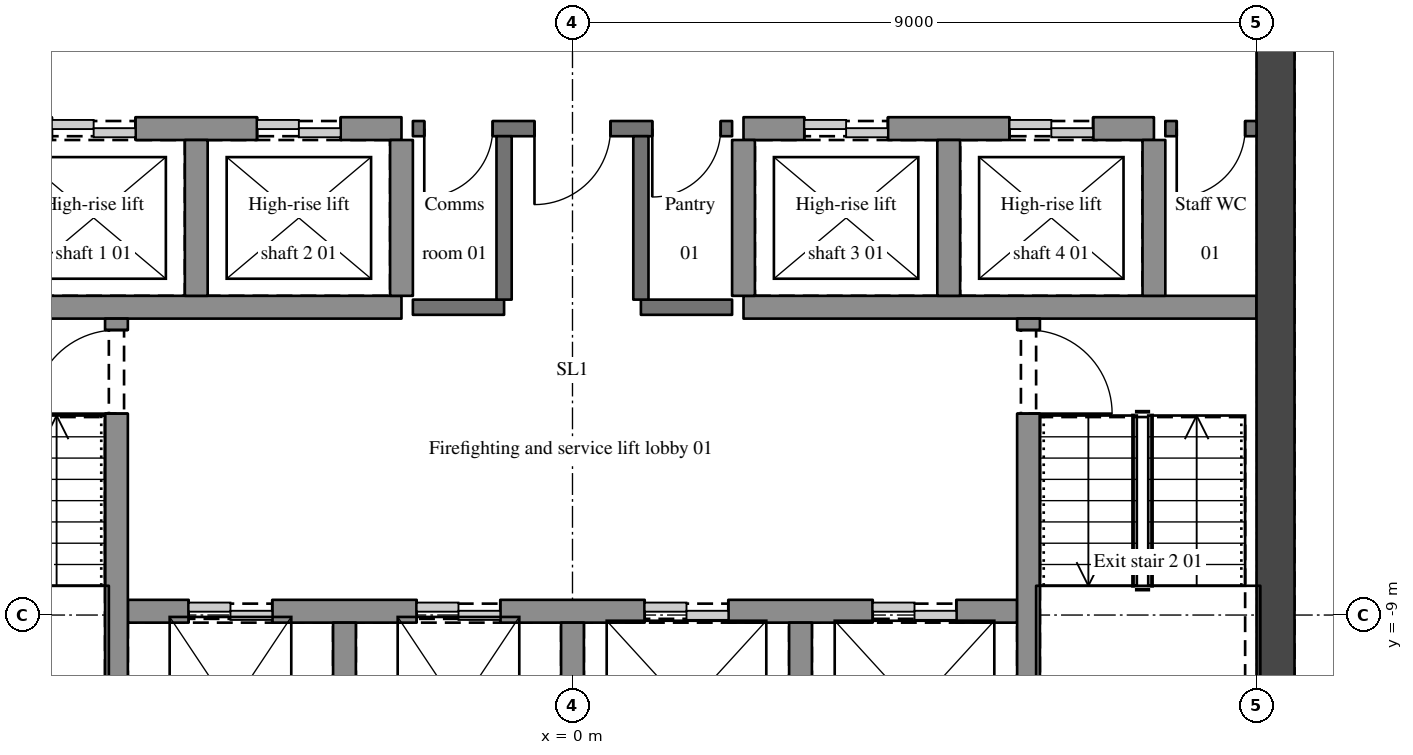
"""IFC4 building model, lengths in metres.
Left out: names, types, materials, properties, quantities, classifications, styles, units other than length and angle.
Written with IfcOpenShell. Run it as: python <this file> out.ifc"""

import sys

from ifc_helpers import new_model, si_unit, direction, frame, frame_2d, origin, place, context, subcontext, project, spatial, rectangle, extrude, element, fill, save


model = new_model("IFC4")
c1 = context("Model", 3, precision=1e-05, world=origin(), true_north=direction((0.0, 1.0)))
c2 = subcontext(c1, "Body", "Model", "MODEL_VIEW")
j1 = project(units=[si_unit("LENGTHUNIT", "METRE"), si_unit("PLANEANGLEUNIT", "RADIAN")], contexts=[c1])
p1 = place(None, origin())
s1 = spatial("IfcSite", under=j1, at=p1, CompositionType="ELEMENT")
p2 = place(p1, origin())
s2 = spatial("IfcBuilding", under=s1, at=p2, CompositionType="ELEMENT")
p3 = place(p2, frame((0.0, 0.0, 251.85)))
s3 = spatial("IfcBuildingStorey", under=s2, at=p3, CompositionType="ELEMENT", Elevation=251.85)
p4 = place(p3, frame((9.25, -11.5, 0.0), z_axis=(0.0, 0.0, 1.0), x_axis=(0.0, 1.0, 0.0)))
e1 = element("IfcWall", 1, at=p4, inside=s3, PredefinedType="SHEAR", context=c2, shape_type="SweptSolid", body=[
    extrude(rectangle(XDim=11.65, YDim=0.5, at=frame_2d((5.825, 0.0))), origin(), (0.0, 0.0, 1.0), 3.15),
])
p5 = place(p3, frame((-5.85, -8.95, 0.0), z_axis=(0.0, 0.0, 1.0), x_axis=(1.0, 0.0, 0.0)))
e2 = element("IfcWall", 2, at=p5, inside=s3, PredefinedType="SHEAR", context=c2, shape_type="SweptSolid", body=[
    extrude(rectangle(XDim=11.7, YDim=0.3, at=frame_2d((5.85, 0.0))), origin(), (0.0, 0.0, 1.0), 3.15),
])
p6 = place(p5, frame((0.8, 0.0, 0.0)))
e3 = element("IfcOpeningElement", 3, at=p6, cuts=e2, PredefinedType="OPENING", context=c2, shape_type="SweptSolid", body=[
    extrude(rectangle(XDim=1.1, YDim=2.1, at=frame_2d((0.55, 1.05))), frame((0.0, 0.16, 0.0), z_axis=(0.0, -1.0, 0.0), x_axis=(1.0, 0.0, 0.0)), (0.0, 0.0, 1.0), 0.32),
])
p7 = place(p5, frame((3.8, 0.0, 0.0)))
e4 = element("IfcOpeningElement", 4, at=p7, cuts=e2, PredefinedType="OPENING", context=c2, shape_type="SweptSolid", body=[
    extrude(rectangle(XDim=1.1, YDim=2.1, at=frame_2d((0.55, 1.05))), frame((0.0, 0.16, 0.0), z_axis=(0.0, -1.0, 0.0), x_axis=(1.0, 0.0, 0.0)), (0.0, 0.0, 1.0), 0.32),
])
p8 = place(p5, frame((6.8, 0.0, 0.0)))
e5 = element("IfcOpeningElement", 5, at=p8, cuts=e2, PredefinedType="OPENING", context=c2, shape_type="SweptSolid", body=[
    extrude(rectangle(XDim=1.1, YDim=2.1, at=frame_2d((0.55, 1.05))), frame((0.0, 0.16, 0.0), z_axis=(0.0, -1.0, 0.0), x_axis=(1.0, 0.0, 0.0)), (0.0, 0.0, 1.0), 0.32),
])
p9 = place(p5, frame((9.8, 0.0, 0.0)))
e6 = element("IfcOpeningElement", 6, at=p9, cuts=e2, PredefinedType="OPENING", context=c2, shape_type="SweptSolid", body=[
    extrude(rectangle(XDim=1.1, YDim=2.1, at=frame_2d((0.55, 1.05))), frame((0.0, 0.16, 0.0), z_axis=(0.0, -1.0, 0.0), x_axis=(1.0, 0.0, 0.0)), (0.0, 0.0, 1.0), 0.32),
])
p10 = place(p3, frame((-9.0, -4.95, 0.0), z_axis=(0.0, 0.0, 1.0), x_axis=(1.0, 0.0, 0.0)))
e7 = element("IfcWall", 7, at=p10, inside=s3, PredefinedType="SHEAR", context=c2, shape_type="SweptSolid", body=[
    extrude(rectangle(XDim=6.75, YDim=0.3, at=frame_2d((3.375, 0.0))), origin(), (0.0, 0.0, 1.0), 3.15),
])
for number, where, z_axis, x_axis in (
    (8, (-2.1, -4.95, 0.0), (0.0, 0.0, 1.0), (1.0, 0.0, 0.0)),
    (9, (0.9, -4.95, 0.0), (0.0, 0.0, 1.0), (1.0, 0.0, 0.0)),
):
    element("IfcWall", number, at=place(p3, frame(where, z_axis=z_axis, x_axis=x_axis)), inside=s3, PredefinedType="SOLIDWALL", context=c2, shape_type="SweptSolid", body=[
        extrude(rectangle(XDim=1.2, YDim=0.2, at=frame_2d((0.6, 0.0))), origin(), (0.0, 0.0, 1.0), 2.85),
    ])
p11 = place(p3, frame((2.25, -4.95, 0.0), z_axis=(0.0, 0.0, 1.0), x_axis=(1.0, 0.0, 0.0)))
e10 = element("IfcWall", 10, at=p11, inside=s3, PredefinedType="SHEAR", context=c2, shape_type="SweptSolid", body=[
    extrude(rectangle(XDim=6.75, YDim=0.3, at=frame_2d((3.375, 0.0))), origin(), (0.0, 0.0, 1.0), 3.15),
])
p12 = place(p3, frame((-7.65, -2.6, 0.0), z_axis=(0.0, 0.0, 1.0), x_axis=(1.0, 0.0, 0.0)))
e11 = element("IfcWall", 11, at=p12, inside=s3, PredefinedType="SHEAR", context=c2, shape_type="SweptSolid", body=[
    extrude(rectangle(XDim=5.4, YDim=0.3, at=frame_2d((2.7, 0.0))), origin(), (0.0, 0.0, 1.0), 3.15),
])
p13 = place(p12, frame((0.8, 0.0, 0.0)))
e12 = element("IfcOpeningElement", 12, at=p13, cuts=e11, PredefinedType="OPENING", context=c2, shape_type="SweptSolid", body=[
    extrude(rectangle(XDim=1.1, YDim=2.1, at=frame_2d((0.55, 1.05))), frame((0.0, 0.16, 0.0), z_axis=(0.0, -1.0, 0.0), x_axis=(1.0, 0.0, 0.0)), (0.0, 0.0, 1.0), 0.32),
])
p14 = place(p12, frame((3.5, 0.0, 0.0)))
e13 = element("IfcOpeningElement", 13, at=p14, cuts=e11, PredefinedType="OPENING", context=c2, shape_type="SweptSolid", body=[
    extrude(rectangle(XDim=1.1, YDim=2.1, at=frame_2d((0.55, 1.05))), frame((0.0, 0.16, 0.0), z_axis=(0.0, -1.0, 0.0), x_axis=(1.0, 0.0, 0.0)), (0.0, 0.0, 1.0), 0.32),
])
p15 = place(p3, frame((2.1, -2.6, 0.0), z_axis=(0.0, 0.0, 1.0), x_axis=(-1.0, 0.0, 0.0)))
e14 = element("IfcWall", 14, at=p15, inside=s3, PredefinedType="SOLIDWALL", context=c2, shape_type="SweptSolid", body=[
    extrude(rectangle(XDim=4.2, YDim=0.2, at=frame_2d((2.1, 0.0))), origin(), (0.0, 0.0, 1.0), 2.85),
])
p16 = place(p15, frame((1.6, 0.0, 0.0)))
e15 = element("IfcOpeningElement", 15, at=p16, cuts=e14, PredefinedType="OPENING", context=c2, shape_type="SweptSolid", body=[
    extrude(rectangle(XDim=1.0, YDim=2.1, at=frame_2d((0.5, 1.05))), frame((0.0, 0.11, 0.0), z_axis=(0.0, -1.0, 0.0), x_axis=(1.0, 0.0, 0.0)), (0.0, 0.0, 1.0), 0.22),
])
p17 = place(p15, frame((3.15, 0.0, 0.0)))
e16 = element("IfcOpeningElement", 16, at=p17, cuts=e14, PredefinedType="OPENING", context=c2, shape_type="SweptSolid", body=[
    extrude(rectangle(XDim=0.9, YDim=2.1, at=frame_2d((0.45, 1.05))), frame((0.0, 0.11, 0.0), z_axis=(0.0, -1.0, 0.0), x_axis=(1.0, 0.0, 0.0)), (0.0, 0.0, 1.0), 0.22),
])
p18 = place(p15, frame((0.15, 0.0, 0.0)))
e17 = element("IfcOpeningElement", 17, at=p18, cuts=e14, PredefinedType="OPENING", context=c2, shape_type="SweptSolid", body=[
    extrude(rectangle(XDim=0.9, YDim=2.1, at=frame_2d((0.45, 1.05))), frame((0.0, 0.11, 0.0), z_axis=(0.0, -1.0, 0.0), x_axis=(1.0, 0.0, 0.0)), (0.0, 0.0, 1.0), 0.22),
])
p19 = place(p3, frame((2.25, -2.6, 0.0), z_axis=(0.0, 0.0, 1.0), x_axis=(1.0, 0.0, 0.0)))
e18 = element("IfcWall", 18, at=p19, inside=s3, PredefinedType="SHEAR", context=c2, shape_type="SweptSolid", body=[
    extrude(rectangle(XDim=5.4, YDim=0.3, at=frame_2d((2.7, 0.0))), origin(), (0.0, 0.0, 1.0), 3.15),
])
p20 = place(p19, frame((0.8, 0.0, 0.0)))
e19 = element("IfcOpeningElement", 19, at=p20, cuts=e18, PredefinedType="OPENING", context=c2, shape_type="SweptSolid", body=[
    extrude(rectangle(XDim=1.1, YDim=2.1, at=frame_2d((0.55, 1.05))), frame((0.0, 0.16, 0.0), z_axis=(0.0, -1.0, 0.0), x_axis=(1.0, 0.0, 0.0)), (0.0, 0.0, 1.0), 0.32),
])
p21 = place(p19, frame((3.5, 0.0, 0.0)))
e20 = element("IfcOpeningElement", 20, at=p21, cuts=e18, PredefinedType="OPENING", context=c2, shape_type="SweptSolid", body=[
    extrude(rectangle(XDim=1.1, YDim=2.1, at=frame_2d((0.55, 1.05))), frame((0.0, 0.16, 0.0), z_axis=(0.0, -1.0, 0.0), x_axis=(1.0, 0.0, 0.0)), (0.0, 0.0, 1.0), 0.32),
])
p22 = place(p3, frame((9.0, -2.6, 0.0), z_axis=(0.0, 0.0, 1.0), x_axis=(-1.0, 0.0, 0.0)))
e21 = element("IfcWall", 21, at=p22, inside=s3, PredefinedType="SOLIDWALL", context=c2, shape_type="SweptSolid", body=[
    extrude(rectangle(XDim=1.2, YDim=0.2, at=frame_2d((0.6, 0.0))), origin(), (0.0, 0.0, 1.0), 2.85),
])
p23 = place(p22, frame((0.15, 0.0, 0.0)))
e22 = element("IfcOpeningElement", 22, at=p23, cuts=e21, PredefinedType="OPENING", context=c2, shape_type="SweptSolid", body=[
    extrude(rectangle(XDim=0.9, YDim=2.1, at=frame_2d((0.45, 1.05))), frame((0.0, 0.11, 0.0), z_axis=(0.0, -1.0, 0.0), x_axis=(1.0, 0.0, 0.0)), (0.0, 0.0, 1.0), 0.22),
])
p24 = place(p3, frame((-6.0, -11.5, 0.0), z_axis=(0.0, 0.0, 1.0), x_axis=(0.0, 1.0, 0.0)))
e23 = element("IfcWall", 23, at=p24, inside=s3, PredefinedType="SHEAR", context=c2, shape_type="SweptSolid", body=[
    extrude(rectangle(XDim=6.4, YDim=0.3, at=frame_2d((3.2, 0.0))), origin(), (0.0, 0.0, 1.0), 3.15),
])
p25 = place(p24, frame((5.15, 0.0, 0.0)))
e24 = element("IfcOpeningElement", 24, at=p25, cuts=e23, PredefinedType="OPENING", context=c2, shape_type="SweptSolid", body=[
    extrude(rectangle(XDim=1.1, YDim=2.1, at=frame_2d((0.55, 1.05))), frame((0.0, 0.16, 0.0), z_axis=(0.0, -1.0, 0.0), x_axis=(1.0, 0.0, 0.0)), (0.0, 0.0, 1.0), 0.32),
])
p26 = place(p3, frame((-4.95, -4.8, 0.0), z_axis=(0.0, 0.0, 1.0), x_axis=(0.0, 1.0, 0.0)))
e25 = element("IfcWall", 25, at=p26, inside=s3, PredefinedType="SHEAR", context=c2, shape_type="SweptSolid", body=[
    extrude(rectangle(XDim=2.05, YDim=0.3, at=frame_2d((1.025, 0.0))), origin(), (0.0, 0.0, 1.0), 3.15),
])
p27 = place(p3, frame((-3.0, -11.5, 0.0), z_axis=(0.0, 0.0, 1.0), x_axis=(0.0, 1.0, 0.0)))
e26 = element("IfcWall", 26, at=p27, inside=s3, PredefinedType="SHEAR", context=c2, shape_type="SweptSolid", body=[
    extrude(rectangle(XDim=2.4, YDim=0.3, at=frame_2d((1.2, 0.0))), origin(), (0.0, 0.0, 1.0), 3.15),
])
p28 = place(p3, frame((-2.25, -4.8, 0.0), z_axis=(0.0, 0.0, 1.0), x_axis=(0.0, 1.0, 0.0)))
e27 = element("IfcWall", 27, at=p28, inside=s3, PredefinedType="SHEAR", context=c2, shape_type="SweptSolid", body=[
    extrude(rectangle(XDim=2.05, YDim=0.3, at=frame_2d((1.025, 0.0))), origin(), (0.0, 0.0, 1.0), 3.15),
])
p29 = place(p3, frame((-0.9, -4.85, 0.0), z_axis=(0.0, 0.0, 1.0), x_axis=(0.0, 1.0, 0.0)))
e28 = element("IfcWall", 28, at=p29, inside=s3, PredefinedType="SOLIDWALL", context=c2, shape_type="SweptSolid", body=[
    extrude(rectangle(XDim=2.15, YDim=0.2, at=frame_2d((1.075, 0.0))), origin(), (0.0, 0.0, 1.0), 2.85),
])
p30 = place(p3, frame((0.0, -11.5, 0.0), z_axis=(0.0, 0.0, 1.0), x_axis=(0.0, 1.0, 0.0)))
e29 = element("IfcWall", 29, at=p30, inside=s3, PredefinedType="SHEAR", context=c2, shape_type="SweptSolid", body=[
    extrude(rectangle(XDim=2.4, YDim=0.3, at=frame_2d((1.2, 0.0))), origin(), (0.0, 0.0, 1.0), 3.15),
])
p31 = place(p3, frame((0.9, -4.85, 0.0), z_axis=(0.0, 0.0, 1.0), x_axis=(0.0, 1.0, 0.0)))
e30 = element("IfcWall", 30, at=p31, inside=s3, PredefinedType="SOLIDWALL", context=c2, shape_type="SweptSolid", body=[
    extrude(rectangle(XDim=2.15, YDim=0.2, at=frame_2d((1.075, 0.0))), origin(), (0.0, 0.0, 1.0), 2.85),
])
p32 = place(p3, frame((2.25, -4.8, 0.0), z_axis=(0.0, 0.0, 1.0), x_axis=(0.0, 1.0, 0.0)))
e31 = element("IfcWall", 31, at=p32, inside=s3, PredefinedType="SHEAR", context=c2, shape_type="SweptSolid", body=[
    extrude(rectangle(XDim=2.05, YDim=0.3, at=frame_2d((1.025, 0.0))), origin(), (0.0, 0.0, 1.0), 3.15),
])
p33 = place(p3, frame((3.0, -11.5, 0.0), z_axis=(0.0, 0.0, 1.0), x_axis=(0.0, 1.0, 0.0)))
e32 = element("IfcWall", 32, at=p33, inside=s3, PredefinedType="SHEAR", context=c2, shape_type="SweptSolid", body=[
    extrude(rectangle(XDim=2.4, YDim=0.3, at=frame_2d((1.2, 0.0))), origin(), (0.0, 0.0, 1.0), 3.15),
])
p34 = place(p3, frame((4.95, -4.8, 0.0), z_axis=(0.0, 0.0, 1.0), x_axis=(0.0, 1.0, 0.0)))
e33 = element("IfcWall", 33, at=p34, inside=s3, PredefinedType="SHEAR", context=c2, shape_type="SweptSolid", body=[
    extrude(rectangle(XDim=2.05, YDim=0.3, at=frame_2d((1.025, 0.0))), origin(), (0.0, 0.0, 1.0), 3.15),
])
p35 = place(p3, frame((6.0, -5.1, 0.0), z_axis=(0.0, 0.0, 1.0), x_axis=(0.0, -1.0, 0.0)))
e34 = element("IfcWall", 34, at=p35, inside=s3, PredefinedType="SHEAR", context=c2, shape_type="SweptSolid", body=[
    extrude(rectangle(XDim=6.4, YDim=0.3, at=frame_2d((3.2, 0.0))), origin(), (0.0, 0.0, 1.0), 3.15),
])
p36 = place(p35, frame((0.15, 0.0, 0.0)))
e35 = element("IfcOpeningElement", 35, at=p36, cuts=e34, PredefinedType="OPENING", context=c2, shape_type="SweptSolid", body=[
    extrude(rectangle(XDim=1.1, YDim=2.1, at=frame_2d((0.55, 1.05))), frame((0.0, 0.16, 0.0), z_axis=(0.0, -1.0, 0.0), x_axis=(1.0, 0.0, 0.0)), (0.0, 0.0, 1.0), 0.32),
])
p37 = place(p3, frame((7.65, -4.8, 0.0), z_axis=(0.0, 0.0, 1.0), x_axis=(0.0, 1.0, 0.0)))
e36 = element("IfcWall", 36, at=p37, inside=s3, PredefinedType="SHEAR", context=c2, shape_type="SweptSolid", body=[
    extrude(rectangle(XDim=2.05, YDim=0.3, at=frame_2d((1.025, 0.0))), origin(), (0.0, 0.0, 1.0), 3.15),
])
p38 = place(p16, origin())
e37 = element("IfcDoor", 37, at=p38, inside=s3, OperationType="SINGLE_SWING_RIGHT", PredefinedType="DOOR", context=c2, shape_type="SweptSolid", body=[
    extrude(rectangle(XDim=1.0, YDim=2.1, at=frame_2d((0.5, 1.05))), frame((0.0, 0.025, 0.0), z_axis=(0.0, -1.0, 0.0), x_axis=(1.0, 0.0, 0.0)), (0.0, 0.0, 1.0), 0.05),
])
fill(e15, e37)
p39 = place(p25, origin())
e38 = element("IfcDoor", 38, at=p39, inside=s3, OperationType="SINGLE_SWING_LEFT", PredefinedType="DOOR", context=c2, shape_type="SweptSolid", body=[
    extrude(rectangle(XDim=1.1, YDim=2.1, at=frame_2d((0.55, 1.05))), frame((0.0, 0.025, 0.0), z_axis=(0.0, -1.0, 0.0), x_axis=(1.0, 0.0, 0.0)), (0.0, 0.0, 1.0), 0.05),
])
fill(e24, e38)
p40 = place(p36, origin())
e39 = element("IfcDoor", 39, at=p40, inside=s3, OperationType="SINGLE_SWING_RIGHT", PredefinedType="DOOR", context=c2, shape_type="SweptSolid", body=[
    extrude(rectangle(XDim=1.1, YDim=2.1, at=frame_2d((0.55, 1.05))), frame((0.0, 0.025, 0.0), z_axis=(0.0, -1.0, 0.0), x_axis=(1.0, 0.0, 0.0)), (0.0, 0.0, 1.0), 0.05),
])
fill(e35, e39)
p41 = place(p17, origin())
e40 = element("IfcDoor", 40, at=p41, inside=s3, OperationType="SINGLE_SWING_RIGHT", PredefinedType="DOOR", context=c2, shape_type="SweptSolid", body=[
    extrude(rectangle(XDim=0.9, YDim=2.1, at=frame_2d((0.45, 1.05))), frame((0.0, 0.025, 0.0), z_axis=(0.0, -1.0, 0.0), x_axis=(1.0, 0.0, 0.0)), (0.0, 0.0, 1.0), 0.05),
])
fill(e16, e40)
p42 = place(p18, origin())
e41 = element("IfcDoor", 41, at=p42, inside=s3, OperationType="SINGLE_SWING_RIGHT", PredefinedType="DOOR", context=c2, shape_type="SweptSolid", body=[
    extrude(rectangle(XDim=0.9, YDim=2.1, at=frame_2d((0.45, 1.05))), frame((0.0, 0.025, 0.0), z_axis=(0.0, -1.0, 0.0), x_axis=(1.0, 0.0, 0.0)), (0.0, 0.0, 1.0), 0.05),
])
fill(e17, e41)
p43 = place(p23, origin())
e42 = element("IfcDoor", 42, at=p43, inside=s3, OperationType="SINGLE_SWING_RIGHT", PredefinedType="DOOR", context=c2, shape_type="SweptSolid", body=[
    extrude(rectangle(XDim=0.9, YDim=2.1, at=frame_2d((0.45, 1.05))), frame((0.0, 0.025, 0.0), z_axis=(0.0, -1.0, 0.0), x_axis=(1.0, 0.0, 0.0)), (0.0, 0.0, 1.0), 0.05),
])
fill(e22, e42)
p44 = place(p6, origin())
e43 = element("IfcDoor", 43, at=p44, inside=s3, OperationType="DOUBLE_DOOR_SLIDING", PredefinedType="DOOR", context=c2, shape_type="SweptSolid", body=[
    extrude(rectangle(XDim=1.1, YDim=2.1, at=frame_2d((0.55, 1.05))), frame((0.0, 0.025, 0.0), z_axis=(0.0, -1.0, 0.0), x_axis=(1.0, 0.0, 0.0)), (0.0, 0.0, 1.0), 0.05),
])
fill(e3, e43)
p45 = place(p7, origin())
e44 = element("IfcDoor", 44, at=p45, inside=s3, OperationType="DOUBLE_DOOR_SLIDING", PredefinedType="DOOR", context=c2, shape_type="SweptSolid", body=[
    extrude(rectangle(XDim=1.1, YDim=2.1, at=frame_2d((0.55, 1.05))), frame((0.0, 0.025, 0.0), z_axis=(0.0, -1.0, 0.0), x_axis=(1.0, 0.0, 0.0)), (0.0, 0.0, 1.0), 0.05),
])
fill(e4, e44)
p46 = place(p13, origin())
e45 = element("IfcDoor", 45, at=p46, inside=s3, OperationType="DOUBLE_DOOR_SLIDING", PredefinedType="DOOR", context=c2, shape_type="SweptSolid", body=[
    extrude(rectangle(XDim=1.1, YDim=2.1, at=frame_2d((0.55, 1.05))), frame((0.0, 0.025, 0.0), z_axis=(0.0, -1.0, 0.0), x_axis=(1.0, 0.0, 0.0)), (0.0, 0.0, 1.0), 0.05),
])
fill(e12, e45)
p47 = place(p14, origin())
e46 = element("IfcDoor", 46, at=p47, inside=s3, OperationType="DOUBLE_DOOR_SLIDING", PredefinedType="DOOR", context=c2, shape_type="SweptSolid", body=[
    extrude(rectangle(XDim=1.1, YDim=2.1, at=frame_2d((0.55, 1.05))), frame((0.0, 0.025, 0.0), z_axis=(0.0, -1.0, 0.0), x_axis=(1.0, 0.0, 0.0)), (0.0, 0.0, 1.0), 0.05),
])
fill(e13, e46)
p48 = place(p20, origin())
e47 = element("IfcDoor", 47, at=p48, inside=s3, OperationType="DOUBLE_DOOR_SLIDING", PredefinedType="DOOR", context=c2, shape_type="SweptSolid", body=[
    extrude(rectangle(XDim=1.1, YDim=2.1, at=frame_2d((0.55, 1.05))), frame((0.0, 0.025, 0.0), z_axis=(0.0, -1.0, 0.0), x_axis=(1.0, 0.0, 0.0)), (0.0, 0.0, 1.0), 0.05),
])
fill(e19, e47)
p49 = place(p21, origin())
e48 = element("IfcDoor", 48, at=p49, inside=s3, OperationType="DOUBLE_DOOR_SLIDING", PredefinedType="DOOR", context=c2, shape_type="SweptSolid", body=[
    extrude(rectangle(XDim=1.1, YDim=2.1, at=frame_2d((0.55, 1.05))), frame((0.0, 0.025, 0.0), z_axis=(0.0, -1.0, 0.0), x_axis=(1.0, 0.0, 0.0)), (0.0, 0.0, 1.0), 0.05),
])
fill(e20, e48)
p50 = place(p8, origin())
e49 = element("IfcDoor", 49, at=p50, inside=s3, OperationType="DOUBLE_DOOR_SLIDING", PredefinedType="DOOR", context=c2, shape_type="SweptSolid", body=[
    extrude(rectangle(XDim=1.1, YDim=2.1, at=frame_2d((0.55, 1.05))), frame((0.0, 0.025, 0.0), z_axis=(0.0, -1.0, 0.0), x_axis=(1.0, 0.0, 0.0)), (0.0, 0.0, 1.0), 0.05),
])
fill(e5, e49)
p51 = place(p9, origin())
e50 = element("IfcDoor", 50, at=p51, inside=s3, OperationType="DOUBLE_DOOR_SLIDING", PredefinedType="DOOR", context=c2, shape_type="SweptSolid", body=[
    extrude(rectangle(XDim=1.1, YDim=2.1, at=frame_2d((0.55, 1.05))), frame((0.0, 0.025, 0.0), z_axis=(0.0, -1.0, 0.0), x_axis=(1.0, 0.0, 0.0)), (0.0, 0.0, 1.0), 0.05),
])
fill(e6, e50)
save(model, sys.argv[1])
